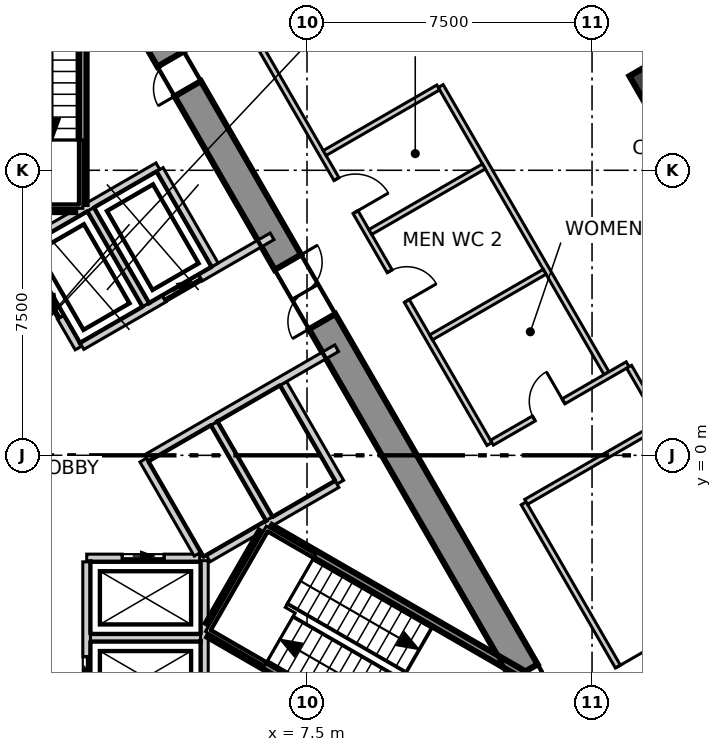
"""IFC4 building model, lengths in metres.
Left out: names, types, materials, properties, quantities, classifications, styles, units other than length and angle.
Written with IfcOpenShell. Run it as: python <this file> out.ifc"""

import sys

from ifc_helpers import new_model, si_unit, direction, frame, frame_2d, origin, origin_2d, place, context, subcontext, project, spatial, polyline, rectangle, outline, extrude, element, fill, save


model = new_model("IFC4")
c1 = context("Model", 3, precision=1e-05, world=origin(), true_north=direction((0.0, 1.0)))
c2 = subcontext(c1, "Body", "Model", "MODEL_VIEW")
j1 = project(units=[si_unit("LENGTHUNIT", "METRE"), si_unit("PLANEANGLEUNIT", "RADIAN")], contexts=[c1])
p1 = place(None, origin())
s1 = spatial("IfcSite", under=j1, at=p1, CompositionType="ELEMENT")
p2 = place(p1, origin())
s2 = spatial("IfcBuilding", under=s1, at=p2, CompositionType="ELEMENT")
p3 = place(p2, frame((0.0, 0.0, 128.3)))
s3 = spatial("IfcBuildingStorey", under=s2, at=p3, CompositionType="ELEMENT", Elevation=128.3)
p4 = place(p3, frame((11.547, -8.6, -0.3), z_axis=(0.0, 0.0, 1.0), x_axis=(0.49987182685, 0.866099391942, 0.0)))
e1 = element("IfcWall", 1, at=p4, inside=s3, PredefinedType="SHEAR", context=c2, shape_type="SweptSolid", body=[
    extrude(outline(polyline([(-0.231, -0.4), (1.674, -0.4), (3.579, -0.4), (3.118, 0.4), (1.674, 0.4), (0.231, 0.4), (-0.231, -0.4)])), origin(), (0.0, 0.0, 1.0), 4.0),
])
p5 = place(p4, frame((0.974, 0.0, 0.3)))
e2 = element("IfcOpeningElement", 2, at=p5, cuts=e1, PredefinedType="OPENING", context=c2, shape_type="SweptSolid", body=[
    extrude(rectangle(XDim=1.4, YDim=2.1, at=frame_2d((0.7, 1.05))), frame((0.0, 0.41, 0.0), z_axis=(0.0, -1.0, 0.0), x_axis=(1.0, 0.0, 0.0)), (0.0, 0.0, 1.0), 0.82),
])
p6 = place(p3, frame((13.221, -5.7, -0.3), z_axis=(0.0, 0.0, 1.0), x_axis=(-0.499995765644, 0.866027848477, 0.0)))
e3 = element("IfcWall", 3, at=p6, inside=s3, PredefinedType="SHEAR", context=c2, shape_type="SweptSolid", body=[
    extrude(outline(polyline([(-0.231, -0.4), (1.732, -0.4), (3.695, -0.4), (5.658, -0.4), (7.621, -0.4), (9.584, -0.4), (11.547, -0.4), (13.51, -0.4), (15.473, -0.4), (17.436, -0.4), (19.399, -0.4), (21.362, -0.4), (23.325, -0.4), (22.863, 0.4), (20.977, 0.4), (19.091, 0.4), (17.205, 0.4), (15.319, 0.4), (13.433, 0.4), (11.547, 0.4), (9.661, 0.4), (7.775, 0.4), (5.889, 0.4), (4.003, 0.4), (2.117, 0.4), (0.231, 0.4), (-0.231, -0.4)])), origin(), (0.0, 0.0, 1.0), 4.0),
])
p7 = place(p6, frame((10.647, 0.0, 0.3)))
e4 = element("IfcOpeningElement", 4, at=p7, cuts=e3, PredefinedType="OPENING", context=c2, shape_type="SweptSolid", body=[
    extrude(rectangle(XDim=1.8, YDim=2.1, at=frame_2d((0.9, 1.05))), frame((0.0, 0.41, 0.0), z_axis=(0.0, -1.0, 0.0), x_axis=(1.0, 0.0, 0.0)), (0.0, 0.0, 1.0), 0.82),
])
p8 = place(p6, frame((17.721, 0.0, 0.3)))
e5 = element("IfcOpeningElement", 5, at=p8, cuts=e3, PredefinedType="OPENING", context=c2, shape_type="SweptSolid", body=[
    extrude(rectangle(XDim=0.9, YDim=2.1, at=frame_2d((0.45, 1.05))), frame((0.0, 0.41, 0.0), z_axis=(0.0, -1.0, 0.0), x_axis=(1.0, 0.0, 0.0)), (0.0, 0.0, 1.0), 0.82),
])
p9 = place(p3, frame((16.742, 9.666, -0.3), z_axis=(0.0, 0.0, 1.0), x_axis=(-0.5, 0.866025403784, 0.0)))
e6 = element("IfcColumn", 6, at=p9, inside=s3, PredefinedType="COLUMN", context=c2, shape_type="SweptSolid", body=[
    extrude(rectangle(XDim=1.3, YDim=1.0, at=origin_2d()), origin(), (0.0, 0.0, 1.0), 4.0),
])
p10 = place(p3, frame((31.588, -14.647, 0.0), z_axis=(0.0, 0.0, 1.0), x_axis=(-0.500005036527, 0.866022495925, 0.0)))
e7 = element("IfcWall", 7, at=p10, inside=s3, PredefinedType="ELEMENTEDWALL", context=c2, shape_type="SweptSolid", body=[
    extrude(rectangle(XDim=56.938, YDim=0.2, at=frame_2d((28.469, 0.0))), origin(), (0.0, 0.0, 1.0), 3.7),
])
p11 = place(p10, frame((2.25, 0.0, 0.9)))
e8 = element("IfcOpeningElement", 8, at=p11, cuts=e7, PredefinedType="OPENING", context=c2, shape_type="SweptSolid", body=[
    extrude(rectangle(XDim=4.9, YDim=2.5, at=frame_2d((2.45, 1.25))), frame((0.0, 0.11, 0.0), z_axis=(0.0, -1.0, 0.0), x_axis=(1.0, 0.0, 0.0)), (0.0, 0.0, 1.0), 0.22),
])
p12 = place(p10, frame((9.044, 0.0, 0.9)))
e9 = element("IfcOpeningElement", 9, at=p12, cuts=e7, PredefinedType="OPENING", context=c2, shape_type="SweptSolid", body=[
    extrude(rectangle(XDim=4.9, YDim=2.5, at=frame_2d((2.45, 1.25))), frame((0.0, 0.11, 0.0), z_axis=(0.0, -1.0, 0.0), x_axis=(1.0, 0.0, 0.0)), (0.0, 0.0, 1.0), 0.22),
])
p13 = place(p10, frame((15.838, 0.0, 0.9)))
e10 = element("IfcOpeningElement", 10, at=p13, cuts=e7, PredefinedType="OPENING", context=c2, shape_type="SweptSolid", body=[
    extrude(rectangle(XDim=4.9, YDim=2.5, at=frame_2d((2.45, 1.25))), frame((0.0, 0.11, 0.0), z_axis=(0.0, -1.0, 0.0), x_axis=(1.0, 0.0, 0.0)), (0.0, 0.0, 1.0), 0.22),
])
p14 = place(p10, frame((22.632, 0.0, 0.9)))
e11 = element("IfcOpeningElement", 11, at=p14, cuts=e7, PredefinedType="OPENING", context=c2, shape_type="SweptSolid", body=[
    extrude(rectangle(XDim=4.9, YDim=2.5, at=frame_2d((2.45, 1.25))), frame((0.0, 0.11, 0.0), z_axis=(0.0, -1.0, 0.0), x_axis=(1.0, 0.0, 0.0)), (0.0, 0.0, 1.0), 0.22),
])
p15 = place(p10, frame((29.426, 0.0, 0.9)))
e12 = element("IfcOpeningElement", 12, at=p15, cuts=e7, PredefinedType="OPENING", context=c2, shape_type="SweptSolid", body=[
    extrude(rectangle(XDim=4.9, YDim=2.5, at=frame_2d((2.45, 1.25))), frame((0.0, 0.11, 0.0), z_axis=(0.0, -1.0, 0.0), x_axis=(1.0, 0.0, 0.0)), (0.0, 0.0, 1.0), 0.22),
])
p16 = place(p10, frame((36.22, 0.0, 0.9)))
e13 = element("IfcOpeningElement", 13, at=p16, cuts=e7, PredefinedType="OPENING", context=c2, shape_type="SweptSolid", body=[
    extrude(rectangle(XDim=4.9, YDim=2.5, at=frame_2d((2.45, 1.25))), frame((0.0, 0.11, 0.0), z_axis=(0.0, -1.0, 0.0), x_axis=(1.0, 0.0, 0.0)), (0.0, 0.0, 1.0), 0.22),
])
p17 = place(p10, frame((43.014, 0.0, 0.9)))
e14 = element("IfcOpeningElement", 14, at=p17, cuts=e7, PredefinedType="OPENING", context=c2, shape_type="SweptSolid", body=[
    extrude(rectangle(XDim=4.9, YDim=2.5, at=frame_2d((2.45, 1.25))), frame((0.0, 0.11, 0.0), z_axis=(0.0, -1.0, 0.0), x_axis=(1.0, 0.0, 0.0)), (0.0, 0.0, 1.0), 0.22),
])
p18 = place(p10, frame((49.808, 0.0, 0.9)))
e15 = element("IfcOpeningElement", 15, at=p18, cuts=e7, PredefinedType="OPENING", context=c2, shape_type="SweptSolid", body=[
    extrude(rectangle(XDim=4.9, YDim=2.5, at=frame_2d((2.45, 1.25))), frame((0.0, 0.11, 0.0), z_axis=(0.0, -1.0, 0.0), x_axis=(1.0, 0.0, 0.0)), (0.0, 0.0, 1.0), 0.22),
])
p19 = place(p3, frame((0.076, 21.468, 0.0), z_axis=(0.0, 0.0, 1.0), x_axis=(0.50001203818, -0.866018453426, 0.0)))
e16 = element("IfcWall", 16, at=p19, inside=s3, PredefinedType="PARTITIONING", context=c2, shape_type="SweptSolid", body=[
    extrude(rectangle(XDim=24.448, YDim=0.15, at=frame_2d((12.224, 0.0))), origin(), (0.0, 0.0, 1.0), 3.7),
])
p20 = place(p19, frame((9.798, 0.0, 0.0)))
e17 = element("IfcOpeningElement", 17, at=p20, cuts=e16, PredefinedType="OPENING", context=c2, shape_type="SweptSolid", body=[
    extrude(rectangle(XDim=1.1, YDim=2.1, at=frame_2d((0.55, 1.05))), frame((0.0, 0.085, 0.0), z_axis=(0.0, -1.0, 0.0), x_axis=(1.0, 0.0, 0.0)), (0.0, 0.0, 1.0), 0.17),
])
p21 = place(p19, frame((19.198, 0.0, 0.0)))
e18 = element("IfcOpeningElement", 18, at=p21, cuts=e16, PredefinedType="OPENING", context=c2, shape_type="SweptSolid", body=[
    extrude(rectangle(XDim=0.9, YDim=2.1, at=frame_2d((0.45, 1.05))), frame((0.0, 0.085, 0.0), z_axis=(0.0, -1.0, 0.0), x_axis=(1.0, 0.0, 0.0)), (0.0, 0.0, 1.0), 0.17),
])
p22 = place(p19, frame((16.398, 0.0, 0.0)))
e19 = element("IfcOpeningElement", 19, at=p22, cuts=e16, PredefinedType="OPENING", context=c2, shape_type="SweptSolid", body=[
    extrude(rectangle(XDim=1.0, YDim=2.1, at=frame_2d((0.5, 1.05))), frame((0.0, 0.085, 0.0), z_axis=(0.0, -1.0, 0.0), x_axis=(1.0, 0.0, 0.0)), (0.0, 0.0, 1.0), 0.17),
])
p23 = place(p19, frame((1.815, 0.0, 0.0)))
e20 = element("IfcOpeningElement", 20, at=p23, cuts=e16, PredefinedType="OPENING", context=c2, shape_type="SweptSolid", body=[
    extrude(rectangle(XDim=1.1, YDim=2.1, at=frame_2d((0.55, 1.05))), frame((0.0, 0.085, 0.0), z_axis=(0.0, -1.0, 0.0), x_axis=(1.0, 0.0, 0.0)), (0.0, 0.0, 1.0), 0.17),
])
p24 = place(p3, frame((13.201, -1.264, 0.0), z_axis=(0.0, 0.0, 1.0), x_axis=(0.499973466559, -0.866040722332, 0.0)))
e21 = element("IfcWall", 21, at=p24, inside=s3, PredefinedType="PARTITIONING", context=c2, shape_type="SweptSolid", body=[
    extrude(rectangle(XDim=10.861, YDim=0.15, at=frame_2d((5.43, 0.0))), origin(), (0.0, 0.0, 1.0), 3.7),
])
p25 = place(p24, frame((4.96, 0.0, 0.0)))
e22 = element("IfcOpeningElement", 22, at=p25, cuts=e21, PredefinedType="OPENING", context=c2, shape_type="SweptSolid", body=[
    extrude(rectangle(XDim=1.1, YDim=2.1, at=frame_2d((0.55, 1.05))), frame((0.0, 0.085, 0.0), z_axis=(0.0, -1.0, 0.0), x_axis=(1.0, 0.0, 0.0)), (0.0, 0.0, 1.0), 0.17),
])
p26 = place(p3, frame((11.018, 9.717, 0.0), z_axis=(0.0, 0.0, 1.0), x_axis=(0.499888770922, -0.866089612399, 0.0)))
e23 = element("IfcWall", 23, at=p26, inside=s3, PredefinedType="PARTITIONING", context=c2, shape_type="SweptSolid", body=[
    extrude(rectangle(XDim=8.726, YDim=0.15, at=frame_2d((4.363, 0.0))), origin(), (0.0, 0.0, 1.0), 3.7),
])
p27 = place(p3, frame((7.965, 7.954, 0.0), z_axis=(0.0, 0.0, 1.0), x_axis=(0.866044174857, 0.499967486139, 0.0)))
e24 = element("IfcWall", 24, at=p27, inside=s3, PredefinedType="PARTITIONING", context=c2, shape_type="SweptSolid", body=[
    extrude(rectangle(XDim=3.45, YDim=0.15, at=frame_2d((1.725, 0.0))), origin(), (0.0, 0.0, 1.0), 3.7),
])
for number, where, z_axis, x_axis in (
    (25, (9.165, 5.876, 0.0), (0.0, 0.0, 1.0), (0.866, 0.5, 0.0)),
    (26, (10.765, 3.104, 0.0), (0.0, 0.0, 1.0), (0.866, 0.5, 0.0)),
):
    element("IfcWall", number, at=place(p3, frame(where, z_axis=z_axis, x_axis=x_axis)), inside=s3, PredefinedType="PARTITIONING", context=c2, shape_type="SweptSolid", body=[
        extrude(rectangle(XDim=3.45, YDim=0.15, at=frame_2d((1.725, 0.0))), origin(), (0.0, 0.0, 1.0), 3.7),
    ])
p28 = place(p3, frame((12.366, 0.333, 0.0), z_axis=(0.0, 0.0, 1.0), x_axis=(0.865997263264, 0.500048737644, 0.0)))
e27 = element("IfcWall", 27, at=p28, inside=s3, PredefinedType="PARTITIONING", context=c2, shape_type="SweptSolid", body=[
    extrude(rectangle(XDim=4.124, YDim=0.15, at=frame_2d((2.062, 0.0))), origin(), (0.0, 0.0, 1.0), 3.7),
])
p29 = place(p28, frame((1.274, 0.0, 0.0)))
e28 = element("IfcOpeningElement", 28, at=p29, cuts=e27, PredefinedType="OPENING", context=c2, shape_type="SweptSolid", body=[
    extrude(rectangle(XDim=0.9, YDim=2.1, at=frame_2d((0.45, 1.05))), frame((0.0, 0.085, 0.0), z_axis=(0.0, -1.0, 0.0), x_axis=(1.0, 0.0, 0.0)), (0.0, 0.0, 1.0), 0.17),
])
p30 = place(p3, frame((15.975, 2.331, 0.0), z_axis=(0.0, 0.0, 1.0), x_axis=(0.499640762619, -0.866232710263, 0.0)))
e29 = element("IfcWall", 29, at=p30, inside=s3, PredefinedType="PARTITIONING", context=c2, shape_type="SweptSolid", body=[
    extrude(rectangle(XDim=1.725, YDim=0.15, at=frame_2d((0.862, 0.0))), origin(), (0.0, 0.0, 1.0), 3.7),
])
p31 = place(p3, frame((13.266, -1.225, 0.0), z_axis=(0.0, 0.0, 1.0), x_axis=(0.866079163253, 0.499906874306, 0.0)))
e30 = element("IfcWall", 30, at=p31, inside=s3, PredefinedType="PARTITIONING", context=c2, shape_type="SweptSolid", body=[
    extrude(rectangle(XDim=4.049, YDim=0.15, at=frame_2d((2.024, 0.0))), origin(), (0.0, 0.0, 1.0), 3.7),
])
p32 = place(p3, frame((1.8, -4.8, 0.0), z_axis=(0.0, 0.0, 1.0), x_axis=(1.0, 0.0, 0.0)))
e31 = element("IfcWall", 31, at=p32, inside=s3, PredefinedType="SOLIDWALL", context=c2, shape_type="SweptSolid", body=[
    extrude(rectangle(XDim=2.9, YDim=0.2, at=frame_2d((1.45, 0.0))), origin(), (0.0, 0.0, 1.0), 3.7),
])
p33 = place(p3, frame((1.703, -2.7, 0.0), z_axis=(0.0, 0.0, 1.0), x_axis=(1.0, 0.0, 0.0)))
e32 = element("IfcWall", 32, at=p33, inside=s3, PredefinedType="SOLIDWALL", context=c2, shape_type="SweptSolid", body=[
    extrude(rectangle(XDim=2.973, YDim=0.2, at=frame_2d((1.487, 0.0))), origin(), (0.0, 0.0, 1.0), 3.7),
])
p34 = place(p33, frame((0.936, 0.0, 0.0)))
e33 = element("IfcOpeningElement", 33, at=p34, cuts=e32, PredefinedType="OPENING", context=c2, shape_type="SweptSolid", body=[
    extrude(rectangle(XDim=1.1, YDim=2.1, at=frame_2d((0.55, 1.05))), frame((0.0, 0.11, 0.0), z_axis=(0.0, -1.0, 0.0), x_axis=(1.0, 0.0, 0.0)), (0.0, 0.0, 1.0), 0.22),
])
p35 = place(p3, frame((-0.002, 5.542, 0.0), z_axis=(0.0, 0.0, 1.0), x_axis=(0.866103910842, 0.499863997127, 0.0)))
e34 = element("IfcWall", 34, at=p35, inside=s3, PredefinedType="SOLIDWALL", context=c2, shape_type="SweptSolid", body=[
    extrude(rectangle(XDim=4.131, YDim=0.2, at=frame_2d((2.065, 0.0))), origin(), (0.0, 0.0, 1.0), 3.7),
])
p36 = place(p3, frame((0.0, 5.4, 0.0), z_axis=(0.0, 0.0, 1.0), x_axis=(0.500103862429, -0.865965430478, 0.0)))
e35 = element("IfcWall", 35, at=p36, inside=s3, PredefinedType="SOLIDWALL", context=c2, shape_type="SweptSolid", body=[
    extrude(rectangle(XDim=2.973, YDim=0.2, at=frame_2d((1.487, 0.0))), origin(), (0.0, 0.0, 1.0), 3.7),
])
p37 = place(p36, frame((0.937, 0.0, 0.0)))
e36 = element("IfcOpeningElement", 36, at=p37, cuts=e35, PredefinedType="OPENING", context=c2, shape_type="SweptSolid", body=[
    extrude(rectangle(XDim=1.1, YDim=2.1, at=frame_2d((0.55, 1.05))), frame((0.0, 0.11, 0.0), z_axis=(0.0, -1.0, 0.0), x_axis=(1.0, 0.0, 0.0)), (0.0, 0.0, 1.0), 0.22),
])
p38 = place(p3, frame((3.19, -0.125, 0.0), z_axis=(0.0, 0.0, 1.0), x_axis=(0.499988658015, -0.866031951983, 0.0)))
e37 = element("IfcWall", 37, at=p38, inside=s3, PredefinedType="SOLIDWALL", context=c2, shape_type="SweptSolid", body=[
    extrude(rectangle(XDim=2.858, YDim=0.2, at=frame_2d((1.429, 0.0))), origin(), (0.0, 0.0, 1.0), 3.7),
])
p39 = place(p3, frame((1.577, 2.874, 0.0), z_axis=(0.0, 0.0, 1.0), x_axis=(0.866073694534, 0.499916348638, 0.0)))
e38 = element("IfcWall", 38, at=p39, inside=s3, PredefinedType="SOLIDWALL", context=c2, shape_type="SweptSolid", body=[
    extrude(rectangle(XDim=5.777, YDim=0.2, at=frame_2d((2.888, 0.0))), origin(), (0.0, 0.0, 1.0), 3.7),
])
p40 = place(p39, frame((2.497, 0.0, 0.0)))
e39 = element("IfcOpeningElement", 39, at=p40, cuts=e38, PredefinedType="OPENING", context=c2, shape_type="SweptSolid", body=[
    extrude(rectangle(XDim=1.1, YDim=2.1, at=frame_2d((0.55, 1.05))), frame((0.0, 0.11, 0.0), z_axis=(0.0, -1.0, 0.0), x_axis=(1.0, 0.0, 0.0)), (0.0, 0.0, 1.0), 0.22),
])
p41 = place(p3, frame((1.7, -8.58, 0.0), z_axis=(0.0, 0.0, 1.0), x_axis=(0.0, 1.0, 0.0)))
e40 = element("IfcWall", 40, at=p41, inside=s3, PredefinedType="SOLIDWALL", context=c2, shape_type="SweptSolid", body=[
    extrude(rectangle(XDim=5.777, YDim=0.2, at=frame_2d((2.889, 0.0))), origin(), (0.0, 0.0, 1.0), 3.7),
])
p42 = place(p41, frame((2.18, 0.0, 0.0)))
e41 = element("IfcOpeningElement", 41, at=p42, cuts=e40, PredefinedType="OPENING", context=c2, shape_type="SweptSolid", body=[
    extrude(rectangle(XDim=1.1, YDim=2.1, at=frame_2d((0.55, 1.05))), frame((0.0, 0.11, 0.0), z_axis=(0.0, -1.0, 0.0), x_axis=(1.0, 0.0, 0.0)), (0.0, 0.0, 1.0), 0.22),
])
p43 = place(p3, frame((4.8, -6.8, 0.0), z_axis=(0.0, 0.0, 1.0), x_axis=(0.0, 1.0, 0.0)))
e42 = element("IfcWall", 42, at=p43, inside=s3, PredefinedType="SOLIDWALL", context=c2, shape_type="SweptSolid", body=[
    extrude(rectangle(XDim=4.029, YDim=0.2, at=frame_2d((2.015, 0.0))), origin(), (0.0, 0.0, 1.0), 3.7),
])
p44 = place(p3, frame((3.626, 7.52, 0.0), z_axis=(0.0, 0.0, 1.0), x_axis=(0.500060147554, -0.865990674793, 0.0)))
e43 = element("IfcWall", 43, at=p44, inside=s3, PredefinedType="SOLIDWALL", context=c2, shape_type="SweptSolid", body=[
    extrude(rectangle(XDim=2.9, YDim=0.2, at=frame_2d((1.45, 0.0))), origin(), (0.0, 0.0, 1.0), 3.7),
])
p45 = place(p3, frame((6.876, 1.891, 0.0), z_axis=(0.0, 0.0, 1.0), x_axis=(0.499990139034, -0.866031096941, 0.0)))
e44 = element("IfcWall", 44, at=p45, inside=s3, PredefinedType="SOLIDWALL", context=c2, shape_type="SweptSolid", body=[
    extrude(rectangle(XDim=3.0, YDim=0.2, at=frame_2d((1.5, 0.0))), origin(), (0.0, 0.0, 1.0), 3.7),
])
for number, where, z_axis, x_axis in (
    (45, (1.807, 6.47, 0.0), (0.0, 0.0, 1.0), (0.5, -0.866, 0.0)),
    (46, (5.057, 0.841, 0.0), (0.0, 0.0, 1.0), (0.5, -0.866, 0.0)),
):
    element("IfcWall", number, at=place(p3, frame(where, z_axis=z_axis, x_axis=x_axis)), inside=s3, PredefinedType="SOLIDWALL", context=c2, shape_type="SweptSolid", body=[
        extrude(rectangle(XDim=2.9, YDim=0.2, at=frame_2d((1.45, 0.0))), origin(), (0.0, 0.0, 1.0), 3.7),
    ])
p46 = place(p3, frame((3.278, -0.071, 0.0), z_axis=(0.0, 0.0, 1.0), x_axis=(0.865929348003, 0.5001663366, 0.0)))
e47 = element("IfcWall", 47, at=p46, inside=s3, PredefinedType="SOLIDWALL", context=c2, shape_type="SweptSolid", body=[
    extrude(rectangle(XDim=5.776, YDim=0.2, at=frame_2d((2.888, 0.0))), origin(), (0.0, 0.0, 1.0), 3.7),
])
p47 = place(p3, frame((4.9, -2.714, 0.0), z_axis=(0.0, 0.0, 1.0), x_axis=(0.865992350556, 0.500057245502, 0.0)))
e48 = element("IfcWall", 48, at=p47, inside=s3, PredefinedType="SOLIDWALL", context=c2, shape_type="SweptSolid", body=[
    extrude(rectangle(XDim=3.914, YDim=0.2, at=frame_2d((1.957, 0.0))), origin(), (0.0, 0.0, 1.0), 3.7),
])
p48 = place(p3, frame((1.6, 6.615, 0.0), z_axis=(0.0, 0.0, 1.0), x_axis=(0.0, 1.0, 0.0)))
e49 = element("IfcWall", 49, at=p48, inside=s3, PredefinedType="SOLIDWALL", context=c2, shape_type="SweptSolid", body=[
    extrude(rectangle(XDim=7.665, YDim=0.2, at=frame_2d((3.833, 0.0))), origin(), (0.0, 0.0, 1.0), 3.7),
])
p49 = place(p3, frame((-1.4, 6.5, 0.0), z_axis=(0.0, 0.0, 1.0), x_axis=(1.0, 0.0, 0.0)))
e50 = element("IfcWall", 50, at=p49, inside=s3, PredefinedType="SOLIDWALL", context=c2, shape_type="SweptSolid", body=[
    extrude(rectangle(XDim=2.8, YDim=0.2, at=frame_2d((1.4, 0.0))), origin(), (0.0, 0.0, 1.0), 3.7),
])
p50 = place(p3, frame((4.929, -4.693, 0.0), z_axis=(0.0, 0.0, 1.0), x_axis=(0.866005769735, -0.50003400563, 0.0)))
e51 = element("IfcWall", 51, at=p50, inside=s3, PredefinedType="SOLIDWALL", context=c2, shape_type="SweptSolid", body=[
    extrude(rectangle(XDim=7.665, YDim=0.2, at=frame_2d((3.833, 0.0))), origin(), (0.0, 0.0, 1.0), 3.7),
])
p51 = place(p3, frame((4.929, -4.462, 0.0), z_axis=(0.0, 0.0, 1.0), x_axis=(0.500200581029, 0.865909567298, 0.0)))
e52 = element("IfcWall", 52, at=p51, inside=s3, PredefinedType="SOLIDWALL", context=c2, shape_type="SweptSolid", body=[
    extrude(rectangle(XDim=2.799, YDim=0.2, at=frame_2d((1.399, 0.0))), origin(), (0.0, 0.0, 1.0), 3.7),
])
p52 = place(p3, frame((6.529, -1.922, 0.0), z_axis=(0.0, 0.0, 1.0), x_axis=(0.866060938598, -0.499938446846, 0.0)))
e53 = element("IfcWall", 53, at=p52, inside=s3, PredefinedType="SOLIDWALL", context=c2, shape_type="SweptSolid", body=[
    extrude(rectangle(XDim=7.665, YDim=0.2, at=frame_2d((3.832, 0.0))), origin(), (0.0, 0.0, 1.0), 3.7),
])
p53 = place(p34, origin())
e54 = element("IfcDoor", 54, at=p53, inside=s3, OperationType="SLIDING_TO_LEFT", PredefinedType="DOOR", context=c2, shape_type="SweptSolid", body=[
    extrude(rectangle(XDim=1.1, YDim=2.1, at=frame_2d((0.55, 1.05))), frame((0.0, 0.025, 0.0), z_axis=(0.0, -1.0, 0.0), x_axis=(1.0, 0.0, 0.0)), (0.0, 0.0, 1.0), 0.05),
])
fill(e33, e54)
p54 = place(p42, origin())
e55 = element("IfcDoor", 55, at=p54, inside=s3, OperationType="SLIDING_TO_LEFT", PredefinedType="DOOR", context=c2, shape_type="SweptSolid", body=[
    extrude(rectangle(XDim=1.1, YDim=2.1, at=frame_2d((0.55, 1.05))), frame((0.0, 0.025, 0.0), z_axis=(0.0, -1.0, 0.0), x_axis=(1.0, 0.0, 0.0)), (0.0, 0.0, 1.0), 0.05),
])
fill(e41, e55)
p55 = place(p37, origin())
e56 = element("IfcDoor", 56, at=p55, inside=s3, OperationType="SLIDING_TO_LEFT", PredefinedType="DOOR", context=c2, shape_type="SweptSolid", body=[
    extrude(rectangle(XDim=1.1, YDim=2.1, at=frame_2d((0.55, 1.05))), frame((0.0, 0.025, 0.0), z_axis=(0.0, -1.0, 0.0), x_axis=(1.0, 0.0, 0.0)), (0.0, 0.0, 1.0), 0.05),
])
fill(e36, e56)
p56 = place(p40, origin())
e57 = element("IfcDoor", 57, at=p56, inside=s3, OperationType="SLIDING_TO_LEFT", PredefinedType="DOOR", context=c2, shape_type="SweptSolid", body=[
    extrude(rectangle(XDim=1.1, YDim=2.1, at=frame_2d((0.55, 1.05))), frame((0.0, 0.025, 0.0), z_axis=(0.0, -1.0, 0.0), x_axis=(1.0, 0.0, 0.0)), (0.0, 0.0, 1.0), 0.05),
])
fill(e39, e57)
p57 = place(p25, origin())
e58 = element("IfcDoor", 58, at=p57, inside=s3, OperationType="SINGLE_SWING_RIGHT", PredefinedType="DOOR", context=c2, shape_type="SweptSolid", body=[
    extrude(rectangle(XDim=1.1, YDim=2.1, at=frame_2d((0.55, 1.05))), frame((0.0, 0.025, 0.0), z_axis=(0.0, -1.0, 0.0), x_axis=(1.0, 0.0, 0.0)), (0.0, 0.0, 1.0), 0.05),
])
fill(e22, e58)
p58 = place(p29, origin())
e59 = element("IfcDoor", 59, at=p58, inside=s3, OperationType="SINGLE_SWING_LEFT", PredefinedType="DOOR", context=c2, shape_type="SweptSolid", body=[
    extrude(rectangle(XDim=0.9, YDim=2.1, at=frame_2d((0.45, 1.05))), frame((0.0, 0.025, 0.0), z_axis=(0.0, -1.0, 0.0), x_axis=(1.0, 0.0, 0.0)), (0.0, 0.0, 1.0), 0.05),
])
fill(e28, e59)
p59 = place(p21, origin())
e60 = element("IfcDoor", 60, at=p59, inside=s3, OperationType="SINGLE_SWING_LEFT", PredefinedType="DOOR", context=c2, shape_type="SweptSolid", body=[
    extrude(rectangle(XDim=0.9, YDim=2.1, at=frame_2d((0.45, 1.05))), frame((0.0, 0.025, 0.0), z_axis=(0.0, -1.0, 0.0), x_axis=(1.0, 0.0, 0.0)), (0.0, 0.0, 1.0), 0.05),
])
fill(e18, e60)
p60 = place(p22, origin())
e61 = element("IfcDoor", 61, at=p60, inside=s3, OperationType="SINGLE_SWING_LEFT", PredefinedType="DOOR", context=c2, shape_type="SweptSolid", body=[
    extrude(rectangle(XDim=1.0, YDim=2.1, at=frame_2d((0.5, 1.05))), frame((0.0, 0.025, 0.0), z_axis=(0.0, -1.0, 0.0), x_axis=(1.0, 0.0, 0.0)), (0.0, 0.0, 1.0), 0.05),
])
fill(e19, e61)
p61 = place(p7, origin())
e62 = element("IfcDoor", 62, at=p61, inside=s3, OperationType="DOUBLE_DOOR_SINGLE_SWING", PredefinedType="DOOR", context=c2, shape_type="SweptSolid", body=[
    extrude(rectangle(XDim=1.8, YDim=2.1, at=frame_2d((0.9, 1.05))), frame((0.0, 0.025, 0.0), z_axis=(0.0, -1.0, 0.0), x_axis=(1.0, 0.0, 0.0)), (0.0, 0.0, 1.0), 0.05),
])
fill(e4, e62)
p62 = place(p8, origin())
e63 = element("IfcDoor", 63, at=p62, inside=s3, OperationType="SINGLE_SWING_RIGHT", PredefinedType="DOOR", context=c2, shape_type="SweptSolid", body=[
    extrude(rectangle(XDim=0.9, YDim=2.1, at=frame_2d((0.45, 1.05))), frame((0.0, 0.025, 0.0), z_axis=(0.0, -1.0, 0.0), x_axis=(1.0, 0.0, 0.0)), (0.0, 0.0, 1.0), 0.05),
])
fill(e5, e63)
save(model, sys.argv[1])
